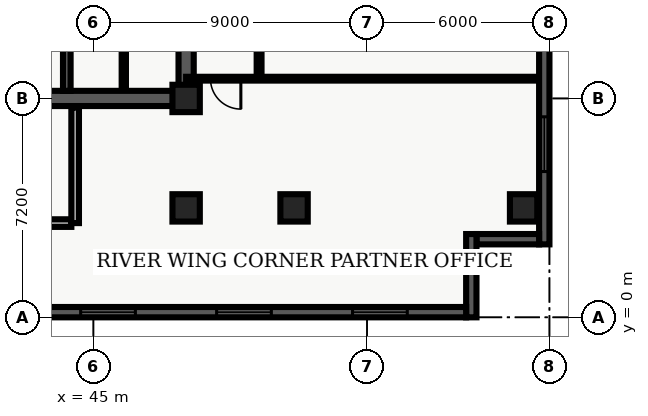
"""IFC4 building model, lengths in metres.
Left out: names, types, materials, properties, quantities, classifications, styles, units other than length and angle.
Written with IfcOpenShell. Run it as: python <this file> out.ifc"""

import sys

from ifc_helpers import new_model, entity, si_unit, converted_unit, direction, frame, origin_with_axes, origin_2d_with_axis, place, context, subcontext, project, spatial, polyline, rectangle, outline, extrude, element, fill, save


model = new_model("IFC4")
c1 = context("Model", 3, precision=1e-05, world=origin_with_axes(), true_north=direction((0.0, 1.0)))
c2 = subcontext(c1, "Body", "Model", "MODEL_VIEW")
j1 = project(units=[si_unit("LENGTHUNIT", "METRE"), converted_unit("PLANEANGLEUNIT", "DEGREE", entity("IfcPlaneAngleMeasure", 0.017), si_unit("PLANEANGLEUNIT", "RADIAN"), dimensions=[0, 0, 0, 0, 0, 0, 0])], contexts=[c1])
p1 = place(None, origin_with_axes())
s1 = spatial("IfcSite", under=j1, at=p1, CompositionType="ELEMENT")
p2 = place(p1, origin_with_axes())
s2 = spatial("IfcBuilding", under=s1, at=p2, CompositionType="ELEMENT")
p3 = place(p2, frame((0.0, 0.0, 208.2), z_axis=(0.0, 0.0, 1.0), x_axis=(1.0, 0.0, 0.0)))
s3 = spatial("IfcBuildingStorey", under=s2, at=p3, CompositionType="ELEMENT", Elevation=208.2)
p4 = place(p3, frame((40.2, 7.2, 0.0), z_axis=(0.0, 0.0, 1.0), x_axis=(1.0, 0.0, 0.0)))
e1 = element("IfcWall", 1, at=p4, inside=s3, PredefinedType="SHEAR", context=c2, shape_type="SweptSolid", body=[
    extrude(outline(polyline([(0.0, -0.25), (7.85, -0.25), (7.85, 0.25), (0.0, 0.25), (0.0, -0.25)])), origin_with_axes(), (0.0, 0.0, 1.0), 3.66),
])
p5 = place(p4, frame((2.175, 0.0, 0.0), z_axis=(0.0, 0.0, 1.0), x_axis=(1.0, 0.0, 0.0)))
e2 = element("IfcOpeningElement", 2, at=p5, cuts=e1, PredefinedType="OPENING", context=c2, shape_type="SweptSolid", body=[
    extrude(rectangle(XDim=1.05, YDim=0.52, at=origin_2d_with_axis()), origin_with_axes(), (0.0, 0.0, 1.0), 2.15),
])
p6 = place(p3, frame((48.05, 7.2, 0.0), z_axis=(0.0, 0.0, 1.0), x_axis=(0.0, 1.0, 0.0)))
e3 = element("IfcWall", 3, at=p6, inside=s3, PredefinedType="SHEAR", context=c2, shape_type="SweptSolid", body=[
    extrude(outline(polyline([(0.0, -0.25), (15.6, -0.25), (15.6, 0.25), (0.0, 0.25), (0.0, -0.25)])), origin_with_axes(), (0.0, 0.0, 1.0), 3.66),
])
p7 = place(p6, frame((5.975, 0.0, 0.0), z_axis=(0.0, 0.0, 1.0), x_axis=(1.0, 0.0, 0.0)))
e4 = element("IfcOpeningElement", 4, at=p7, cuts=e3, PredefinedType="OPENING", context=c2, shape_type="SweptSolid", body=[
    extrude(rectangle(XDim=1.05, YDim=0.52, at=origin_2d_with_axis()), origin_with_axes(), (0.0, 0.0, 1.0), 2.15),
])
p8 = place(p6, frame((2.725, 0.0, 0.0), z_axis=(0.0, 0.0, 1.0), x_axis=(1.0, 0.0, 0.0)))
e5 = element("IfcOpeningElement", 5, at=p8, cuts=e3, PredefinedType="OPENING", context=c2, shape_type="SweptSolid", body=[
    extrude(rectangle(XDim=0.95, YDim=0.52, at=origin_2d_with_axis()), origin_with_axes(), (0.0, 0.0, 1.0), 2.15),
])
p9 = place(p3, frame((44.125, 7.45, 0.0), z_axis=(0.0, 0.0, 1.0), x_axis=(0.0, 1.0, 0.0)))
e6 = element("IfcWall", 6, at=p9, inside=s3, PredefinedType="SHEAR", context=c2, shape_type="SweptSolid", body=[
    extrude(outline(polyline([(0.0, -0.125), (15.1, -0.125), (15.1, 0.125), (0.0, 0.125), (0.0, -0.125)])), origin_with_axes(), (0.0, 0.0, 1.0), 3.66),
])
p10 = place(p3, frame((40.325, 3.1, 0.0), z_axis=(0.0, 0.0, 1.0), x_axis=(1.0, 0.0, 0.0)))
e7 = element("IfcWall", 7, at=p10, inside=s3, PredefinedType="SOLIDWALL", context=c2, shape_type="SweptSolid", body=[
    extrude(outline(polyline([(0.0, -0.125), (3.95, -0.125), (3.95, 0.125), (0.0, 0.125), (0.0, -0.125)])), origin_with_axes(), (0.0, 0.0, 1.0), 2.7),
])
p11 = place(p3, frame((44.4, 3.1, 0.0), z_axis=(0.0, 0.0, 1.0), x_axis=(0.0, 1.0, 0.0)))
e8 = element("IfcWall", 8, at=p11, inside=s3, PredefinedType="SOLIDWALL", context=c2, shape_type="SweptSolid", body=[
    extrude(outline(polyline([(0.0, -0.125), (3.8, -0.125), (3.8, 0.125), (0.0, 0.125), (0.0, -0.125)])), origin_with_axes(), (0.0, 0.0, 1.0), 2.7),
])
for number, where, z_axis, x_axis in (
    (9, (48.05, 3.6, 0.0), (0.0, 0.0, 1.0), (1.0, 0.0, 0.0)),
    (10, (48.05, 7.2, 0.0), (0.0, 0.0, 1.0), (1.0, 0.0, 0.0)),
    (11, (51.6, 3.6, 0.0), (0.0, 0.0, 1.0), (1.0, 0.0, 0.0)),
    (12, (59.15, 3.6, 0.0), (0.0, 0.0, 1.0), (1.0, 0.0, 0.0)),
):
    element("IfcColumn", number, at=place(p3, frame(where, z_axis=z_axis, x_axis=x_axis)), inside=s3, PredefinedType="COLUMN", context=c2, shape_type="SweptSolid", body=[
        extrude(rectangle(XDim=0.9, YDim=0.9, at=origin_2d_with_axis()), origin_with_axes(), (0.0, 0.0, 1.0), 3.9),
    ])
p12 = place(p3, frame((46.0, 7.5, 0.0), z_axis=(0.0, 0.0, 1.0), x_axis=(0.0, 1.0, 0.0)))
e13 = element("IfcWall", 13, at=p12, inside=s3, PredefinedType="PARTITIONING", context=c2, shape_type="SweptSolid", body=[
    extrude(outline(polyline([(0.0, -0.07), (4.08, -0.07), (4.08, 0.07), (0.0, 0.07), (0.0, -0.07)])), origin_with_axes(), (0.0, 0.0, 1.0), 2.7),
])
p13 = place(p12, frame((2.0, 0.0, 0.0), z_axis=(0.0, 0.0, 1.0), x_axis=(1.0, 0.0, 0.0)))
e14 = element("IfcOpeningElement", 14, at=p13, cuts=e13, PredefinedType="OPENING", context=c2, shape_type="SweptSolid", body=[
    extrude(rectangle(XDim=0.9, YDim=0.16, at=origin_2d_with_axis()), origin_with_axes(), (0.0, 0.0, 1.0), 2.15),
])
p14 = place(p3, frame((50.45, 7.85, 0.0), z_axis=(0.0, 0.0, 1.0), x_axis=(0.0, 1.0, 0.0)))
e15 = element("IfcWall", 15, at=p14, inside=s3, PredefinedType="PARTITIONING", context=c2, shape_type="SweptSolid", body=[
    extrude(outline(polyline([(0.0, -0.08), (18.8, -0.08), (18.8, 0.08), (0.0, 0.08), (0.0, -0.08)])), origin_with_axes(), (0.0, 0.0, 1.0), 2.7),
])
p15 = place(p14, frame((5.852, 0.0, 0.0), z_axis=(0.0, 0.0, 1.0), x_axis=(1.0, 0.0, 0.0)))
e16 = element("IfcOpeningElement", 16, at=p15, cuts=e15, PredefinedType="OPENING", context=c2, shape_type="SweptSolid", body=[
    extrude(rectangle(XDim=1.0, YDim=0.18, at=origin_2d_with_axis()), origin_with_axes(), (0.0, 0.0, 1.0), 2.15),
])
p16 = place(p14, frame((11.249, 0.0, 0.0), z_axis=(0.0, 0.0, 1.0), x_axis=(1.0, 0.0, 0.0)))
e17 = element("IfcOpeningElement", 17, at=p16, cuts=e15, PredefinedType="OPENING", context=c2, shape_type="SweptSolid", body=[
    extrude(rectangle(XDim=1.0, YDim=0.18, at=origin_2d_with_axis()), origin_with_axes(), (0.0, 0.0, 1.0), 2.15),
])
p17 = place(p14, frame((14.113, 0.0, 0.0), z_axis=(0.0, 0.0, 1.0), x_axis=(1.0, 0.0, 0.0)))
e18 = element("IfcOpeningElement", 18, at=p17, cuts=e15, PredefinedType="OPENING", context=c2, shape_type="SweptSolid", body=[
    extrude(rectangle(XDim=1.0, YDim=0.18, at=origin_2d_with_axis()), origin_with_axes(), (0.0, 0.0, 1.0), 2.15),
])
p18 = place(p3, frame((59.665, 7.85, 0.0), z_axis=(0.0, 0.0, 1.0), x_axis=(-1.0, 0.0, 0.0)))
e19 = element("IfcWall", 19, at=p18, inside=s3, PredefinedType="PARTITIONING", context=c2, shape_type="SweptSolid", body=[
    extrude(outline(polyline([(0.0, -0.062), (11.615, -0.062), (11.615, 0.062), (0.0, 0.062), (0.0, -0.062)])), origin_with_axes(), (0.0, 0.0, 1.0), 2.7),
])
p19 = place(p18, frame((10.315, 0.0, 0.0), z_axis=(0.0, 0.0, 1.0), x_axis=(1.0, 0.0, 0.0)))
e20 = element("IfcOpeningElement", 20, at=p19, cuts=e19, PredefinedType="OPENING", context=c2, shape_type="SweptSolid", body=[
    extrude(rectangle(XDim=1.0, YDim=0.145, at=origin_2d_with_axis()), origin_with_axes(), (0.0, 0.0, 1.0), 2.15),
])
p20 = place(p3, frame((59.83, 26.06, 0.0), z_axis=(0.0, 0.0, 1.0), x_axis=(0.0, -1.0, 0.0)))
e21 = element("IfcWall", 21, at=p20, inside=s3, PredefinedType="SOLIDWALL", context=c2, shape_type="SweptSolid", body=[
    extrude(outline(polyline([(0.0, -0.17), (23.66, -0.17), (23.66, 0.17), (0.0, 0.17), (0.0, -0.17)])), origin_with_axes(), (0.0, 0.0, 1.0), 3.66),
])
p21 = place(p20, frame((3.696, 0.0, 0.45), z_axis=(0.0, 0.0, 1.0), x_axis=(1.0, 0.0, 0.0)))
e22 = element("IfcOpeningElement", 22, at=p21, cuts=e21, PredefinedType="OPENING", context=c2, shape_type="SweptSolid", body=[
    extrude(rectangle(XDim=1.8, YDim=0.36, at=origin_2d_with_axis()), origin_with_axes(), (0.0, 0.0, 1.0), 2.1),
])
p22 = place(p20, frame((11.83, 0.0, 0.45), z_axis=(0.0, 0.0, 1.0), x_axis=(1.0, 0.0, 0.0)))
e23 = element("IfcOpeningElement", 23, at=p22, cuts=e21, PredefinedType="OPENING", context=c2, shape_type="SweptSolid", body=[
    extrude(rectangle(XDim=1.8, YDim=0.36, at=origin_2d_with_axis()), origin_with_axes(), (0.0, 0.0, 1.0), 2.1),
])
p23 = place(p20, frame((20.364, 0.0, 0.45), z_axis=(0.0, 0.0, 1.0), x_axis=(1.0, 0.0, 0.0)))
e24 = element("IfcOpeningElement", 24, at=p23, cuts=e21, PredefinedType="OPENING", context=c2, shape_type="SweptSolid", body=[
    extrude(rectangle(XDim=1.8, YDim=0.36, at=origin_2d_with_axis()), origin_with_axes(), (0.0, 0.0, 1.0), 2.1),
])
p24 = place(p3, frame((59.66, 2.57, 0.0), z_axis=(0.0, 0.0, 1.0), x_axis=(-1.0, 0.0, 0.0)))
e25 = element("IfcWall", 25, at=p24, inside=s3, PredefinedType="SOLIDWALL", context=c2, shape_type="SweptSolid", body=[
    extrude(outline(polyline([(0.0, -0.17), (2.06, -0.17), (2.06, 0.17), (0.0, 0.17), (0.0, -0.17)])), origin_with_axes(), (0.0, 0.0, 1.0), 3.66),
])
p25 = place(p3, frame((57.43, 2.74, 0.0), z_axis=(0.0, 0.0, 1.0), x_axis=(0.0, -1.0, 0.0)))
e26 = element("IfcWall", 26, at=p25, inside=s3, PredefinedType="SOLIDWALL", context=c2, shape_type="SweptSolid", body=[
    extrude(outline(polyline([(0.0, -0.17), (2.74, -0.17), (2.74, 0.17), (0.0, 0.17), (0.0, -0.17)])), origin_with_axes(), (0.0, 0.0, 1.0), 3.66),
])
p26 = place(p3, frame((57.26, 0.17, 0.0), z_axis=(0.0, 0.0, 1.0), x_axis=(-1.0, 0.0, 0.0)))
e27 = element("IfcWall", 27, at=p26, inside=s3, PredefinedType="SOLIDWALL", context=c2, shape_type="SweptSolid", body=[
    extrude(outline(polyline([(0.0, -0.17), (54.86, -0.17), (54.86, 0.17), (0.0, 0.17), (0.0, -0.17)])), origin_with_axes(), (0.0, 0.0, 1.0), 3.66),
])
p27 = place(p26, frame((2.836, 0.0, 0.45), z_axis=(0.0, 0.0, 1.0), x_axis=(1.0, 0.0, 0.0)))
e28 = element("IfcOpeningElement", 28, at=p27, cuts=e27, PredefinedType="OPENING", context=c2, shape_type="SweptSolid", body=[
    extrude(rectangle(XDim=1.8, YDim=0.36, at=origin_2d_with_axis()), origin_with_axes(), (0.0, 0.0, 1.0), 2.1),
])
p28 = place(p26, frame((7.307, 0.0, 0.45), z_axis=(0.0, 0.0, 1.0), x_axis=(1.0, 0.0, 0.0)))
e29 = element("IfcOpeningElement", 29, at=p28, cuts=e27, PredefinedType="OPENING", context=c2, shape_type="SweptSolid", body=[
    extrude(rectangle(XDim=1.8, YDim=0.36, at=origin_2d_with_axis()), origin_with_axes(), (0.0, 0.0, 1.0), 2.1),
])
p29 = place(p26, frame((11.779, 0.0, 0.45), z_axis=(0.0, 0.0, 1.0), x_axis=(1.0, 0.0, 0.0)))
e30 = element("IfcOpeningElement", 30, at=p29, cuts=e27, PredefinedType="OPENING", context=c2, shape_type="SweptSolid", body=[
    extrude(rectangle(XDim=1.8, YDim=0.36, at=origin_2d_with_axis()), origin_with_axes(), (0.0, 0.0, 1.0), 2.1),
])
p30 = place(p26, frame((16.251, 0.0, 0.45), z_axis=(0.0, 0.0, 1.0), x_axis=(1.0, 0.0, 0.0)))
e31 = element("IfcOpeningElement", 31, at=p30, cuts=e27, PredefinedType="OPENING", context=c2, shape_type="SweptSolid", body=[
    extrude(rectangle(XDim=1.8, YDim=0.36, at=origin_2d_with_axis()), origin_with_axes(), (0.0, 0.0, 1.0), 2.1),
])
p31 = place(p26, frame((20.723, 0.0, 0.45), z_axis=(0.0, 0.0, 1.0), x_axis=(1.0, 0.0, 0.0)))
e32 = element("IfcOpeningElement", 32, at=p31, cuts=e27, PredefinedType="OPENING", context=c2, shape_type="SweptSolid", body=[
    extrude(rectangle(XDim=1.8, YDim=0.36, at=origin_2d_with_axis()), origin_with_axes(), (0.0, 0.0, 1.0), 2.1),
])
p32 = place(p26, frame((25.194, 0.0, 0.45), z_axis=(0.0, 0.0, 1.0), x_axis=(1.0, 0.0, 0.0)))
e33 = element("IfcOpeningElement", 33, at=p32, cuts=e27, PredefinedType="OPENING", context=c2, shape_type="SweptSolid", body=[
    extrude(rectangle(XDim=1.8, YDim=0.36, at=origin_2d_with_axis()), origin_with_axes(), (0.0, 0.0, 1.0), 2.1),
])
p33 = place(p26, frame((29.666, 0.0, 0.45), z_axis=(0.0, 0.0, 1.0), x_axis=(1.0, 0.0, 0.0)))
e34 = element("IfcOpeningElement", 34, at=p33, cuts=e27, PredefinedType="OPENING", context=c2, shape_type="SweptSolid", body=[
    extrude(rectangle(XDim=1.8, YDim=0.36, at=origin_2d_with_axis()), origin_with_axes(), (0.0, 0.0, 1.0), 2.1),
])
p34 = place(p26, frame((34.138, 0.0, 0.45), z_axis=(0.0, 0.0, 1.0), x_axis=(1.0, 0.0, 0.0)))
e35 = element("IfcOpeningElement", 35, at=p34, cuts=e27, PredefinedType="OPENING", context=c2, shape_type="SweptSolid", body=[
    extrude(rectangle(XDim=1.8, YDim=0.36, at=origin_2d_with_axis()), origin_with_axes(), (0.0, 0.0, 1.0), 2.1),
])
p35 = place(p26, frame((38.609, 0.0, 0.45), z_axis=(0.0, 0.0, 1.0), x_axis=(1.0, 0.0, 0.0)))
e36 = element("IfcOpeningElement", 36, at=p35, cuts=e27, PredefinedType="OPENING", context=c2, shape_type="SweptSolid", body=[
    extrude(rectangle(XDim=1.8, YDim=0.36, at=origin_2d_with_axis()), origin_with_axes(), (0.0, 0.0, 1.0), 2.1),
])
p36 = place(p26, frame((43.081, 0.0, 0.45), z_axis=(0.0, 0.0, 1.0), x_axis=(1.0, 0.0, 0.0)))
e37 = element("IfcOpeningElement", 37, at=p36, cuts=e27, PredefinedType="OPENING", context=c2, shape_type="SweptSolid", body=[
    extrude(rectangle(XDim=1.8, YDim=0.36, at=origin_2d_with_axis()), origin_with_axes(), (0.0, 0.0, 1.0), 2.1),
])
p37 = place(p26, frame((47.553, 0.0, 0.45), z_axis=(0.0, 0.0, 1.0), x_axis=(1.0, 0.0, 0.0)))
e38 = element("IfcOpeningElement", 38, at=p37, cuts=e27, PredefinedType="OPENING", context=c2, shape_type="SweptSolid", body=[
    extrude(rectangle(XDim=1.8, YDim=0.36, at=origin_2d_with_axis()), origin_with_axes(), (0.0, 0.0, 1.0), 2.1),
])
p38 = place(p26, frame((52.024, 0.0, 0.45), z_axis=(0.0, 0.0, 1.0), x_axis=(1.0, 0.0, 0.0)))
e39 = element("IfcOpeningElement", 39, at=p38, cuts=e27, PredefinedType="OPENING", context=c2, shape_type="SweptSolid", body=[
    extrude(rectangle(XDim=1.8, YDim=0.36, at=origin_2d_with_axis()), origin_with_axes(), (0.0, 0.0, 1.0), 2.1),
])
p39 = place(p18, frame((10.315, 0.0, 0.0), z_axis=(0.0, 0.0, 1.0), x_axis=(1.0, 0.0, 0.0)))
e40 = element("IfcDoor", 40, at=p39, inside=s3, OperationType="SINGLE_SWING_LEFT", PredefinedType="DOOR", context=c2, shape_type="SweptSolid", body=[
    extrude(rectangle(XDim=1.0, YDim=0.075, at=origin_2d_with_axis()), origin_with_axes(), (0.0, 0.0, 1.0), 2.15),
])
fill(e20, e40)
p40 = place(p20, frame((20.364, 0.0, 0.45), z_axis=(0.0, 0.0, 1.0), x_axis=(1.0, 0.0, 0.0)))
e41 = element("IfcWindow", 41, at=p40, inside=s3, PredefinedType="WINDOW", context=c2, shape_type="SweptSolid", body=[
    extrude(rectangle(XDim=1.8, YDim=0.09, at=origin_2d_with_axis()), origin_with_axes(), (0.0, 0.0, 1.0), 2.1),
])
fill(e24, e41)
p41 = place(p26, frame((2.836, 0.0, 0.45), z_axis=(0.0, 0.0, 1.0), x_axis=(1.0, 0.0, 0.0)))
e42 = element("IfcWindow", 42, at=p41, inside=s3, PredefinedType="WINDOW", context=c2, shape_type="SweptSolid", body=[
    extrude(rectangle(XDim=1.8, YDim=0.09, at=origin_2d_with_axis()), origin_with_axes(), (0.0, 0.0, 1.0), 2.1),
])
fill(e28, e42)
p42 = place(p26, frame((7.307, 0.0, 0.45), z_axis=(0.0, 0.0, 1.0), x_axis=(1.0, 0.0, 0.0)))
e43 = element("IfcWindow", 43, at=p42, inside=s3, PredefinedType="WINDOW", context=c2, shape_type="SweptSolid", body=[
    extrude(rectangle(XDim=1.8, YDim=0.09, at=origin_2d_with_axis()), origin_with_axes(), (0.0, 0.0, 1.0), 2.1),
])
fill(e29, e43)
p43 = place(p26, frame((11.779, 0.0, 0.45), z_axis=(0.0, 0.0, 1.0), x_axis=(1.0, 0.0, 0.0)))
e44 = element("IfcWindow", 44, at=p43, inside=s3, PredefinedType="WINDOW", context=c2, shape_type="SweptSolid", body=[
    extrude(rectangle(XDim=1.8, YDim=0.09, at=origin_2d_with_axis()), origin_with_axes(), (0.0, 0.0, 1.0), 2.1),
])
fill(e30, e44)
save(model, sys.argv[1])
